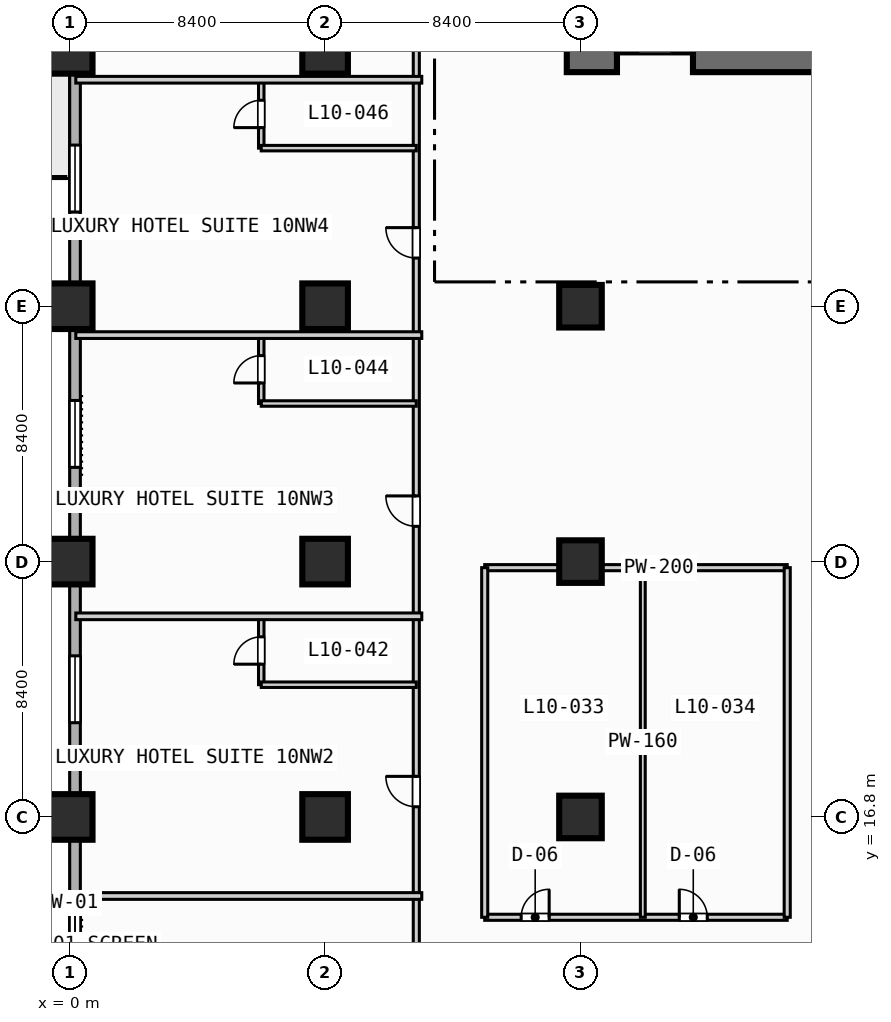
"""IFC4 building model, lengths in metres.
Left out: names, types, materials, properties, quantities, classifications, styles, units other than length and angle.
Written with IfcOpenShell. Run it as: python <this file> out.ifc"""

import sys

from ifc_helpers import new_model, si_unit, direction, frame, frame_2d, origin, origin_2d, place, context, subcontext, project, spatial, rectangle, extrude, element, fill, save


model = new_model("IFC4")
c1 = context("Model", 3, precision=1e-05, world=origin(), true_north=direction((0.0, 1.0)))
c2 = subcontext(c1, "Body", "Model", "MODEL_VIEW")
j1 = project(units=[si_unit("LENGTHUNIT", "METRE"), si_unit("PLANEANGLEUNIT", "RADIAN")], contexts=[c1])
p1 = place(None, origin())
s1 = spatial("IfcSite", under=j1, at=p1, CompositionType="ELEMENT")
p2 = place(p1, origin())
s2 = spatial("IfcBuilding", under=s1, at=p2, CompositionType="ELEMENT")
p3 = place(p2, frame((0.0, 0.0, 47.2)))
s3 = spatial("IfcBuildingStorey", under=s2, at=p3, CompositionType="ELEMENT", Elevation=47.2)
p4 = place(p3, frame((16.35, 41.75, 0.0), z_axis=(0.0, 0.0, 1.0), x_axis=(1.0, 0.0, 0.0)))
e1 = element("IfcWall", 1, at=p4, inside=s3, PredefinedType="SHEAR", context=c2, shape_type="SweptSolid", body=[
    extrude(rectangle(XDim=1.65, YDim=0.9, at=frame_2d((0.825, 0.0))), origin(), (0.0, 0.0, 1.0), 3.55),
])
p5 = place(p3, frame((20.5, 41.75, 0.0), z_axis=(0.0, 0.0, 1.0), x_axis=(1.0, 0.0, 0.0)))
e2 = element("IfcWall", 2, at=p5, inside=s3, PredefinedType="SHEAR", context=c2, shape_type="SweptSolid", body=[
    extrude(rectangle(XDim=5.15, YDim=0.9, at=frame_2d((2.575, 0.0))), origin(), (0.0, 0.0, 1.0), 3.55),
])
for number, where, z_axis, x_axis in (
    (3, (0.0, 16.8, 0.0), (0.0, 0.0, 1.0), (1.0, 0.0, 0.0)),
    (4, (0.0, 25.2, 0.0), (0.0, 0.0, 1.0), (1.0, 0.0, 0.0)),
    (5, (0.0, 33.6, 0.0), (0.0, 0.0, 1.0), (1.0, 0.0, 0.0)),
    (6, (0.0, 42.0, 0.0), (0.0, 0.0, 1.0), (1.0, 0.0, 0.0)),
    (7, (8.4, 16.8, 0.0), (0.0, 0.0, 1.0), (1.0, 0.0, 0.0)),
    (8, (8.4, 25.2, 0.0), (0.0, 0.0, 1.0), (1.0, 0.0, 0.0)),
    (9, (8.4, 33.6, 0.0), (0.0, 0.0, 1.0), (1.0, 0.0, 0.0)),
    (10, (8.4, 42.0, 0.0), (0.0, 0.0, 1.0), (1.0, 0.0, 0.0)),
):
    element("IfcColumn", number, at=place(p3, frame(where, z_axis=z_axis, x_axis=x_axis)), inside=s3, PredefinedType="COLUMN", context=c2, shape_type="SweptSolid", body=[
        extrude(rectangle(XDim=1.5, YDim=1.5, at=origin_2d()), origin(), (0.0, 0.0, 1.0), 3.8),
    ])
for number, where, z_axis, x_axis in (
    (11, (16.8, 16.8, 0.0), (0.0, 0.0, 1.0), (1.0, 0.0, 0.0)),
    (12, (16.8, 25.2, 0.0), (0.0, 0.0, 1.0), (1.0, 0.0, 0.0)),
    (13, (16.8, 33.6, 0.0), (0.0, 0.0, 1.0), (1.0, 0.0, 0.0)),
):
    element("IfcColumn", number, at=place(p3, frame(where, z_axis=z_axis, x_axis=x_axis)), inside=s3, PredefinedType="COLUMN", context=c2, shape_type="SweptSolid", body=[
        extrude(rectangle(XDim=1.4, YDim=1.4, at=origin_2d()), origin(), (0.0, 0.0, 1.0), 3.8),
    ])
p6 = place(p3, frame((0.175, 3.175, 0.0), z_axis=(0.0, 0.0, 1.0), x_axis=(0.0, 1.0, 0.0)))
e14 = element("IfcWall", 14, at=p6, inside=s3, PredefinedType="STANDARD", context=c2, shape_type="SweptSolid", body=[
    extrude(rectangle(XDim=86.05, YDim=0.35, at=frame_2d((43.025, 0.0))), origin(), (0.0, 0.0, 1.0), 3.55),
])
p7 = place(p6, frame((42.325, 0.0, 0.0)))
e15 = element("IfcOpeningElement", 15, at=p7, cuts=e14, PredefinedType="OPENING", context=c2, shape_type="SweptSolid", body=[
    extrude(rectangle(XDim=1.4, YDim=2.2, at=frame_2d((0.7, 1.1))), frame((0.0, 0.185, 0.0), z_axis=(0.0, -1.0, 0.0), x_axis=(1.0, 0.0, 0.0)), (0.0, 0.0, 1.0), 0.37),
])
p8 = place(p6, frame((8.325, 0.0, 0.85)))
e16 = element("IfcOpeningElement", 16, at=p8, cuts=e14, PredefinedType="OPENING", context=c2, shape_type="SweptSolid", body=[
    extrude(rectangle(XDim=2.2, YDim=1.8, at=frame_2d((1.1, 0.9))), frame((0.0, 0.185, 0.0), z_axis=(0.0, -1.0, 0.0), x_axis=(1.0, 0.0, 0.0)), (0.0, 0.0, 1.0), 0.37),
])
p9 = place(p6, frame((16.725, 0.0, 0.85)))
e17 = element("IfcOpeningElement", 17, at=p9, cuts=e14, PredefinedType="OPENING", context=c2, shape_type="SweptSolid", body=[
    extrude(rectangle(XDim=2.2, YDim=1.8, at=frame_2d((1.1, 0.9))), frame((0.0, 0.185, 0.0), z_axis=(0.0, -1.0, 0.0), x_axis=(1.0, 0.0, 0.0)), (0.0, 0.0, 1.0), 0.37),
])
p10 = place(p6, frame((25.125, 0.0, 0.85)))
e18 = element("IfcOpeningElement", 18, at=p10, cuts=e14, PredefinedType="OPENING", context=c2, shape_type="SweptSolid", body=[
    extrude(rectangle(XDim=2.2, YDim=1.8, at=frame_2d((1.1, 0.9))), frame((0.0, 0.185, 0.0), z_axis=(0.0, -1.0, 0.0), x_axis=(1.0, 0.0, 0.0)), (0.0, 0.0, 1.0), 0.37),
])
p11 = place(p6, frame((33.525, 0.0, 0.85)))
e19 = element("IfcOpeningElement", 19, at=p11, cuts=e14, PredefinedType="OPENING", context=c2, shape_type="SweptSolid", body=[
    extrude(rectangle(XDim=2.2, YDim=1.8, at=frame_2d((1.1, 0.9))), frame((0.0, 0.185, 0.0), z_axis=(0.0, -1.0, 0.0), x_axis=(1.0, 0.0, 0.0)), (0.0, 0.0, 1.0), 0.37),
])
p12 = place(p6, frame((56.675, 0.0, 0.85)))
e20 = element("IfcOpeningElement", 20, at=p12, cuts=e14, PredefinedType="OPENING", context=c2, shape_type="SweptSolid", body=[
    extrude(rectangle(XDim=1.8, YDim=1.8, at=frame_2d((0.9, 0.9))), frame((0.0, 0.185, 0.0), z_axis=(0.0, -1.0, 0.0), x_axis=(1.0, 0.0, 0.0)), (0.0, 0.0, 1.0), 0.37),
])
p13 = place(p3, frame((18.0, 42.075, 0.0), z_axis=(0.0, 0.0, 1.0), x_axis=(1.0, 0.0, 0.0)))
e21 = element("IfcWall", 21, at=p13, inside=s3, PredefinedType="SOLIDWALL", context=c2, shape_type="SweptSolid", body=[
    extrude(rectangle(XDim=2.5, YDim=0.25, at=frame_2d((1.25, 0.0))), origin(), (0.0, 0.0, 1.0), 3.55),
])
p14 = place(p13, frame((0.7, 0.0, 0.0)))
e22 = element("IfcOpeningElement", 22, at=p14, cuts=e21, PredefinedType="OPENING", context=c2, shape_type="SweptSolid", body=[
    extrude(rectangle(XDim=1.1, YDim=2.15, at=frame_2d((0.55, 1.075))), frame((0.0, 0.135, 0.0), z_axis=(0.0, -1.0, 0.0), x_axis=(1.0, 0.0, 0.0)), (0.0, 0.0, 1.0), 0.27),
])
p15 = place(p3, frame((13.65, 13.5, 0.0), z_axis=(0.0, 0.0, 1.0), x_axis=(1.0, 0.0, 0.0)))
e23 = element("IfcWall", 23, at=p15, inside=s3, PredefinedType="PARTITIONING", context=c2, shape_type="SweptSolid", body=[
    extrude(rectangle(XDim=9.95, YDim=0.2, at=frame_2d((4.975, 0.0))), origin(), (0.0, 0.0, 1.0), 3.55),
])
p16 = place(p15, frame((1.2, 0.0, 0.0)))
e24 = element("IfcOpeningElement", 24, at=p16, cuts=e23, PredefinedType="OPENING", context=c2, shape_type="SweptSolid", body=[
    extrude(rectangle(XDim=0.92, YDim=2.1, at=frame_2d((0.46, 1.05))), frame((0.0, 0.11, 0.0), z_axis=(0.0, -1.0, 0.0), x_axis=(1.0, 0.0, 0.0)), (0.0, 0.0, 1.0), 0.22),
])
p17 = place(p15, frame((6.4, 0.0, 0.0)))
e25 = element("IfcOpeningElement", 25, at=p17, cuts=e23, PredefinedType="OPENING", context=c2, shape_type="SweptSolid", body=[
    extrude(rectangle(XDim=0.92, YDim=2.1, at=frame_2d((0.46, 1.05))), frame((0.0, 0.11, 0.0), z_axis=(0.0, -1.0, 0.0), x_axis=(1.0, 0.0, 0.0)), (0.0, 0.0, 1.0), 0.22),
])
p18 = place(p3, frame((18.85, 13.5, 0.0), z_axis=(0.0, 0.0, 1.0), x_axis=(0.0, 1.0, 0.0)))
e26 = element("IfcWall", 26, at=p18, inside=s3, PredefinedType="PARTITIONING", context=c2, shape_type="SweptSolid", body=[
    extrude(rectangle(XDim=11.5, YDim=0.16, at=frame_2d((5.75, 0.0))), origin(), (0.0, 0.0, 1.0), 3.55),
])
p19 = place(p3, frame((13.65, 25.0, 0.0), z_axis=(0.0, 0.0, 1.0), x_axis=(1.0, 0.0, 0.0)))
e27 = element("IfcWall", 27, at=p19, inside=s3, PredefinedType="PARTITIONING", context=c2, shape_type="SweptSolid", body=[
    extrude(rectangle(XDim=9.95, YDim=0.2, at=frame_2d((4.975, 0.0))), origin(), (0.0, 0.0, 1.0), 2.8),
])
for number, where, z_axis, x_axis in (
    (28, (13.65, 13.5, 0.0), (0.0, 0.0, 1.0), (0.0, 1.0, 0.0)),
    (29, (23.6, 13.5, 0.0), (0.0, 0.0, 1.0), (0.0, 1.0, 0.0)),
):
    element("IfcWall", number, at=place(p3, frame(where, z_axis=z_axis, x_axis=x_axis)), inside=s3, PredefinedType="PARTITIONING", context=c2, shape_type="SweptSolid", body=[
        extrude(rectangle(XDim=11.5, YDim=0.2, at=frame_2d((5.75, 0.0))), origin(), (0.0, 0.0, 1.0), 3.55),
    ])
p20 = place(p3, frame((11.4, 3.4, 0.0), z_axis=(0.0, 0.0, 1.0), x_axis=(0.0, 1.0, 0.0)))
e30 = element("IfcWall", 30, at=p20, inside=s3, PredefinedType="PARTITIONING", context=c2, shape_type="SweptSolid", body=[
    extrude(rectangle(XDim=60.4, YDim=0.2, at=frame_2d((30.2, 0.0))), origin(), (0.0, 0.0, 1.0), 3.55),
])
p21 = place(p20, frame((6.065, 0.0, 0.0)))
e31 = element("IfcOpeningElement", 31, at=p21, cuts=e30, PredefinedType="OPENING", context=c2, shape_type="SweptSolid", body=[
    extrude(rectangle(XDim=1.0, YDim=2.15, at=frame_2d((0.5, 1.075))), frame((0.0, 0.11, 0.0), z_axis=(0.0, -1.0, 0.0), x_axis=(1.0, 0.0, 0.0)), (0.0, 0.0, 1.0), 0.22),
])
p22 = place(p20, frame((13.735, 0.0, 0.0)))
e32 = element("IfcOpeningElement", 32, at=p22, cuts=e30, PredefinedType="OPENING", context=c2, shape_type="SweptSolid", body=[
    extrude(rectangle(XDim=1.0, YDim=2.15, at=frame_2d((0.5, 1.075))), frame((0.0, 0.11, 0.0), z_axis=(0.0, -1.0, 0.0), x_axis=(1.0, 0.0, 0.0)), (0.0, 0.0, 1.0), 0.22),
])
p23 = place(p20, frame((22.96, 0.0, 0.0)))
e33 = element("IfcOpeningElement", 33, at=p23, cuts=e30, PredefinedType="OPENING", context=c2, shape_type="SweptSolid", body=[
    extrude(rectangle(XDim=1.0, YDim=2.15, at=frame_2d((0.5, 1.075))), frame((0.0, 0.11, 0.0), z_axis=(0.0, -1.0, 0.0), x_axis=(1.0, 0.0, 0.0)), (0.0, 0.0, 1.0), 0.22),
])
p24 = place(p20, frame((31.785, 0.0, 0.0)))
e34 = element("IfcOpeningElement", 34, at=p24, cuts=e30, PredefinedType="OPENING", context=c2, shape_type="SweptSolid", body=[
    extrude(rectangle(XDim=1.0, YDim=2.15, at=frame_2d((0.5, 1.075))), frame((0.0, 0.11, 0.0), z_axis=(0.0, -1.0, 0.0), x_axis=(1.0, 0.0, 0.0)), (0.0, 0.0, 1.0), 0.22),
])
p25 = place(p20, frame((42.56, 0.0, 0.0)))
e35 = element("IfcOpeningElement", 35, at=p25, cuts=e30, PredefinedType="OPENING", context=c2, shape_type="SweptSolid", body=[
    extrude(rectangle(XDim=1.0, YDim=2.15, at=frame_2d((0.5, 1.075))), frame((0.0, 0.11, 0.0), z_axis=(0.0, -1.0, 0.0), x_axis=(1.0, 0.0, 0.0)), (0.0, 0.0, 1.0), 0.22),
])
p26 = place(p20, frame((53.935, 0.0, 0.0)))
e36 = element("IfcOpeningElement", 36, at=p26, cuts=e30, PredefinedType="OPENING", context=c2, shape_type="SweptSolid", body=[
    extrude(rectangle(XDim=1.0, YDim=2.15, at=frame_2d((0.5, 1.075))), frame((0.0, 0.11, 0.0), z_axis=(0.0, -1.0, 0.0), x_axis=(1.0, 0.0, 0.0)), (0.0, 0.0, 1.0), 0.22),
])
p27 = place(p3, frame((0.2, 14.2, 0.0), z_axis=(0.0, 0.0, 1.0), x_axis=(1.0, 0.0, 0.0)))
e37 = element("IfcWall", 37, at=p27, inside=s3, PredefinedType="PARTITIONING", context=c2, shape_type="SweptSolid", body=[
    extrude(rectangle(XDim=11.38, YDim=0.22, at=frame_2d((5.69, 0.0))), origin(), (0.0, 0.0, 1.0), 3.55),
])
p28 = place(p3, frame((6.3, 21.15, 0.0), z_axis=(0.0, 0.0, 1.0), x_axis=(0.0, 1.0, 0.0)))
e38 = element("IfcWall", 38, at=p28, inside=s3, PredefinedType="PLUMBINGWALL", context=c2, shape_type="SweptSolid", body=[
    extrude(rectangle(XDim=2.25, YDim=0.18, at=frame_2d((1.125, 0.0))), origin(), (0.0, 0.0, 1.0), 3.55),
])
p29 = place(p28, frame((0.675, 0.0, 0.0)))
e39 = element("IfcOpeningElement", 39, at=p29, cuts=e38, PredefinedType="OPENING", context=c2, shape_type="SweptSolid", body=[
    extrude(rectangle(XDim=0.9, YDim=2.1, at=frame_2d((0.45, 1.05))), frame((0.0, 0.1, 0.0), z_axis=(0.0, -1.0, 0.0), x_axis=(1.0, 0.0, 0.0)), (0.0, 0.0, 1.0), 0.2),
])
p30 = place(p3, frame((6.3, 21.15, 0.0), z_axis=(0.0, 0.0, 1.0), x_axis=(1.0, 0.0, 0.0)))
e40 = element("IfcWall", 40, at=p30, inside=s3, PredefinedType="PLUMBINGWALL", context=c2, shape_type="SweptSolid", body=[
    extrude(rectangle(XDim=5.1, YDim=0.18, at=frame_2d((2.55, 0.0))), origin(), (0.0, 0.0, 1.0), 3.55),
])
p31 = place(p3, frame((0.2, 23.4, 0.0), z_axis=(0.0, 0.0, 1.0), x_axis=(1.0, 0.0, 0.0)))
e41 = element("IfcWall", 41, at=p31, inside=s3, PredefinedType="PARTITIONING", context=c2, shape_type="SweptSolid", body=[
    extrude(rectangle(XDim=11.38, YDim=0.22, at=frame_2d((5.69, 0.0))), origin(), (0.0, 0.0, 1.0), 3.55),
])
p32 = place(p3, frame((6.3, 30.4, 0.0), z_axis=(0.0, 0.0, 1.0), x_axis=(0.0, 1.0, 0.0)))
e42 = element("IfcWall", 42, at=p32, inside=s3, PredefinedType="PLUMBINGWALL", context=c2, shape_type="SweptSolid", body=[
    extrude(rectangle(XDim=2.25, YDim=0.18, at=frame_2d((1.125, 0.0))), origin(), (0.0, 0.0, 1.0), 3.55),
])
p33 = place(p32, frame((0.675, 0.0, 0.0)))
e43 = element("IfcOpeningElement", 43, at=p33, cuts=e42, PredefinedType="OPENING", context=c2, shape_type="SweptSolid", body=[
    extrude(rectangle(XDim=0.9, YDim=2.1, at=frame_2d((0.45, 1.05))), frame((0.0, 0.1, 0.0), z_axis=(0.0, -1.0, 0.0), x_axis=(1.0, 0.0, 0.0)), (0.0, 0.0, 1.0), 0.2),
])
p34 = place(p3, frame((6.3, 30.4, 0.0), z_axis=(0.0, 0.0, 1.0), x_axis=(1.0, 0.0, 0.0)))
e44 = element("IfcWall", 44, at=p34, inside=s3, PredefinedType="PLUMBINGWALL", context=c2, shape_type="SweptSolid", body=[
    extrude(rectangle(XDim=5.1, YDim=0.18, at=frame_2d((2.55, 0.0))), origin(), (0.0, 0.0, 1.0), 3.55),
])
p35 = place(p3, frame((0.2, 32.65, 0.0), z_axis=(0.0, 0.0, 1.0), x_axis=(1.0, 0.0, 0.0)))
e45 = element("IfcWall", 45, at=p35, inside=s3, PredefinedType="PARTITIONING", context=c2, shape_type="SweptSolid", body=[
    extrude(rectangle(XDim=11.38, YDim=0.22, at=frame_2d((5.69, 0.0))), origin(), (0.0, 0.0, 1.0), 3.55),
])
p36 = place(p3, frame((6.3, 38.8, 0.0), z_axis=(0.0, 0.0, 1.0), x_axis=(0.0, 1.0, 0.0)))
e46 = element("IfcWall", 46, at=p36, inside=s3, PredefinedType="PLUMBINGWALL", context=c2, shape_type="SweptSolid", body=[
    extrude(rectangle(XDim=2.25, YDim=0.18, at=frame_2d((1.125, 0.0))), origin(), (0.0, 0.0, 1.0), 3.55),
])
p37 = place(p36, frame((0.675, 0.0, 0.0)))
e47 = element("IfcOpeningElement", 47, at=p37, cuts=e46, PredefinedType="OPENING", context=c2, shape_type="SweptSolid", body=[
    extrude(rectangle(XDim=0.9, YDim=2.1, at=frame_2d((0.45, 1.05))), frame((0.0, 0.1, 0.0), z_axis=(0.0, -1.0, 0.0), x_axis=(1.0, 0.0, 0.0)), (0.0, 0.0, 1.0), 0.2),
])
p38 = place(p3, frame((6.3, 38.8, 0.0), z_axis=(0.0, 0.0, 1.0), x_axis=(1.0, 0.0, 0.0)))
e48 = element("IfcWall", 48, at=p38, inside=s3, PredefinedType="PLUMBINGWALL", context=c2, shape_type="SweptSolid", body=[
    extrude(rectangle(XDim=5.1, YDim=0.18, at=frame_2d((2.55, 0.0))), origin(), (0.0, 0.0, 1.0), 3.55),
])
p39 = place(p3, frame((0.2, 41.05, 0.0), z_axis=(0.0, 0.0, 1.0), x_axis=(1.0, 0.0, 0.0)))
e49 = element("IfcWall", 49, at=p39, inside=s3, PredefinedType="PARTITIONING", context=c2, shape_type="SweptSolid", body=[
    extrude(rectangle(XDim=11.38, YDim=0.22, at=frame_2d((5.69, 0.0))), origin(), (0.0, 0.0, 1.0), 3.55),
])
p40 = place(p8, origin())
e50 = element("IfcWindow", 50, at=p40, inside=s3, PartitioningType="SINGLE_PANEL", PredefinedType="WINDOW", context=c2, shape_type="SweptSolid", body=[
    extrude(rectangle(XDim=2.2, YDim=1.8, at=frame_2d((1.1, 0.9))), frame((0.0, 0.03, 0.0), z_axis=(0.0, -1.0, 0.0), x_axis=(1.0, 0.0, 0.0)), (0.0, 0.0, 1.0), 0.06),
])
fill(e16, e50)
p41 = place(p9, origin())
e51 = element("IfcWindow", 51, at=p41, inside=s3, PartitioningType="SINGLE_PANEL", PredefinedType="WINDOW", context=c2, shape_type="SweptSolid", body=[
    extrude(rectangle(XDim=2.2, YDim=1.8, at=frame_2d((1.1, 0.9))), frame((0.0, 0.03, 0.0), z_axis=(0.0, -1.0, 0.0), x_axis=(1.0, 0.0, 0.0)), (0.0, 0.0, 1.0), 0.06),
])
fill(e17, e51)
p42 = place(p10, origin())
e52 = element("IfcWindow", 52, at=p42, inside=s3, PartitioningType="SINGLE_PANEL", PredefinedType="WINDOW", context=c2, shape_type="SweptSolid", body=[
    extrude(rectangle(XDim=2.2, YDim=1.8, at=frame_2d((1.1, 0.9))), frame((0.0, 0.03, 0.0), z_axis=(0.0, -1.0, 0.0), x_axis=(1.0, 0.0, 0.0)), (0.0, 0.0, 1.0), 0.06),
])
fill(e18, e52)
p43 = place(p11, origin())
e53 = element("IfcWindow", 53, at=p43, inside=s3, PartitioningType="SINGLE_PANEL", PredefinedType="WINDOW", context=c2, shape_type="SweptSolid", body=[
    extrude(rectangle(XDim=2.2, YDim=1.8, at=frame_2d((1.1, 0.9))), frame((0.0, 0.03, 0.0), z_axis=(0.0, -1.0, 0.0), x_axis=(1.0, 0.0, 0.0)), (0.0, 0.0, 1.0), 0.06),
])
fill(e19, e53)
p44 = place(p16, origin())
e54 = element("IfcDoor", 54, at=p44, inside=s3, OperationType="SINGLE_SWING_RIGHT", PredefinedType="DOOR", context=c2, shape_type="SweptSolid", body=[
    extrude(rectangle(XDim=0.92, YDim=2.1, at=frame_2d((0.46, 1.05))), frame((0.0, 0.025, 0.0), z_axis=(0.0, -1.0, 0.0), x_axis=(1.0, 0.0, 0.0)), (0.0, 0.0, 1.0), 0.05),
])
fill(e24, e54)
p45 = place(p17, origin())
e55 = element("IfcDoor", 55, at=p45, inside=s3, OperationType="SINGLE_SWING_LEFT", PredefinedType="DOOR", context=c2, shape_type="SweptSolid", body=[
    extrude(rectangle(XDim=0.92, YDim=2.1, at=frame_2d((0.46, 1.05))), frame((0.0, 0.025, 0.0), z_axis=(0.0, -1.0, 0.0), x_axis=(1.0, 0.0, 0.0)), (0.0, 0.0, 1.0), 0.05),
])
fill(e25, e55)
p46 = place(p22, origin())
e56 = element("IfcDoor", 56, at=p46, inside=s3, OperationType="SINGLE_SWING_RIGHT", PredefinedType="DOOR", context=c2, shape_type="SweptSolid", body=[
    extrude(rectangle(XDim=1.0, YDim=2.15, at=frame_2d((0.5, 1.075))), frame((0.0, 0.025, 0.0), z_axis=(0.0, -1.0, 0.0), x_axis=(1.0, 0.0, 0.0)), (0.0, 0.0, 1.0), 0.05),
])
fill(e32, e56)
p47 = place(p23, origin())
e57 = element("IfcDoor", 57, at=p47, inside=s3, OperationType="SINGLE_SWING_RIGHT", PredefinedType="DOOR", context=c2, shape_type="SweptSolid", body=[
    extrude(rectangle(XDim=1.0, YDim=2.15, at=frame_2d((0.5, 1.075))), frame((0.0, 0.025, 0.0), z_axis=(0.0, -1.0, 0.0), x_axis=(1.0, 0.0, 0.0)), (0.0, 0.0, 1.0), 0.05),
])
fill(e33, e57)
p48 = place(p24, origin())
e58 = element("IfcDoor", 58, at=p48, inside=s3, OperationType="SINGLE_SWING_RIGHT", PredefinedType="DOOR", context=c2, shape_type="SweptSolid", body=[
    extrude(rectangle(XDim=1.0, YDim=2.15, at=frame_2d((0.5, 1.075))), frame((0.0, 0.025, 0.0), z_axis=(0.0, -1.0, 0.0), x_axis=(1.0, 0.0, 0.0)), (0.0, 0.0, 1.0), 0.05),
])
fill(e34, e58)
p49 = place(p29, origin())
e59 = element("IfcDoor", 59, at=p49, inside=s3, OperationType="SINGLE_SWING_LEFT", PredefinedType="DOOR", context=c2, shape_type="SweptSolid", body=[
    extrude(rectangle(XDim=0.9, YDim=2.1, at=frame_2d((0.45, 1.05))), frame((0.0, 0.025, 0.0), z_axis=(0.0, -1.0, 0.0), x_axis=(1.0, 0.0, 0.0)), (0.0, 0.0, 1.0), 0.05),
])
fill(e39, e59)
p50 = place(p33, origin())
e60 = element("IfcDoor", 60, at=p50, inside=s3, OperationType="SINGLE_SWING_LEFT", PredefinedType="DOOR", context=c2, shape_type="SweptSolid", body=[
    extrude(rectangle(XDim=0.9, YDim=2.1, at=frame_2d((0.45, 1.05))), frame((0.0, 0.025, 0.0), z_axis=(0.0, -1.0, 0.0), x_axis=(1.0, 0.0, 0.0)), (0.0, 0.0, 1.0), 0.05),
])
fill(e43, e60)
p51 = place(p37, origin())
e61 = element("IfcDoor", 61, at=p51, inside=s3, OperationType="SINGLE_SWING_LEFT", PredefinedType="DOOR", context=c2, shape_type="SweptSolid", body=[
    extrude(rectangle(XDim=0.9, YDim=2.1, at=frame_2d((0.45, 1.05))), frame((0.0, 0.025, 0.0), z_axis=(0.0, -1.0, 0.0), x_axis=(1.0, 0.0, 0.0)), (0.0, 0.0, 1.0), 0.05),
])
fill(e47, e61)
save(model, sys.argv[1])
